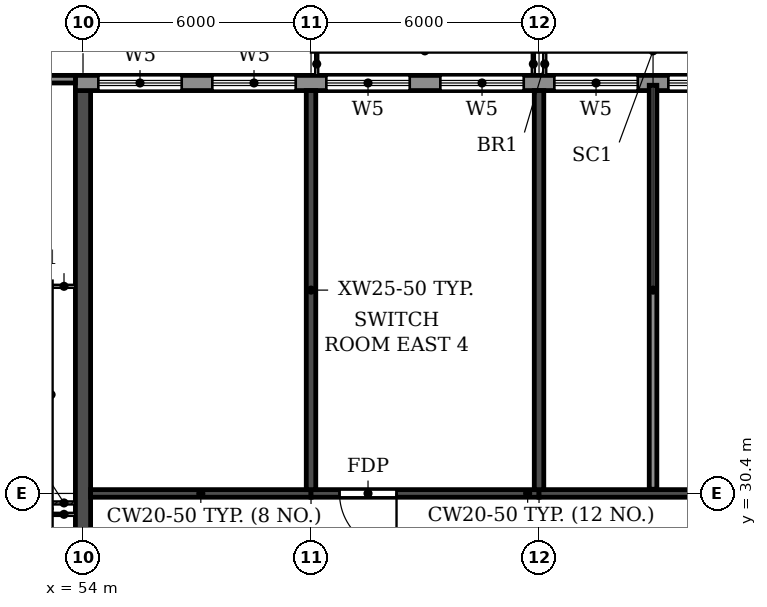
"""IFC4 building model, lengths in metres.
Left out: names, types, materials, properties, quantities, classifications, styles, units other than length and angle.
Written with IfcOpenShell. Run it as: python <this file> out.ifc"""

import sys

from ifc_helpers import new_model, si_unit, direction, frame, frame_2d, origin, place, context, subcontext, project, spatial, polyline, rectangle, outline, extrude, element, fill, save


model = new_model("IFC4")
c1 = context("Model", 3, precision=1e-05, world=origin(), true_north=direction((0.0, 1.0)))
c2 = subcontext(c1, "Body", "Model", "MODEL_VIEW")
j1 = project(units=[si_unit("LENGTHUNIT", "METRE"), si_unit("PLANEANGLEUNIT", "RADIAN")], contexts=[c1])
p1 = place(None, origin())
s1 = spatial("IfcSite", under=j1, at=p1, CompositionType="ELEMENT")
p2 = place(p1, origin())
s2 = spatial("IfcBuilding", under=s1, at=p2, CompositionType="ELEMENT")
p3 = place(p2, frame((0.0, 0.0, 272.4)))
s3 = spatial("IfcBuildingStorey", under=s2, at=p3, CompositionType="ELEMENT", Elevation=272.4)
for number, where, z_axis, x_axis in (
    (1, (60.0, 30.5, 0.0), (0.0, 0.0, 1.0), (0.0, 1.0, 0.0)),
    (2, (66.0, 30.5, 0.0), (0.0, 0.0, 1.0), (0.0, 1.0, 0.0)),
):
    element("IfcWall", number, at=place(p3, frame(where, z_axis=z_axis, x_axis=x_axis)), inside=s3, PredefinedType="SHEAR", context=c2, shape_type="SweptSolid", body=[
        extrude(rectangle(XDim=10.5, YDim=0.25, at=frame_2d((5.25, 0.0))), origin(), (0.0, 0.0, 1.0), 3.05),
    ])
p4 = place(p3, frame((54.0, 0.2, 0.0), z_axis=(0.0, 0.0, 1.0), x_axis=(0.0, 1.0, 0.0)))
e3 = element("IfcWall", 3, at=p4, inside=s3, PredefinedType="SHEAR", context=c2, shape_type="SweptSolid", body=[
    extrude(rectangle(XDim=40.8, YDim=0.4, at=frame_2d((20.4, 0.0))), origin(), (0.0, 0.0, 1.0), 3.05),
])
p5 = place(p3, frame((54.2, 30.4, 0.0), z_axis=(0.0, 0.0, 1.0), x_axis=(1.0, 0.0, 0.0)))
e4 = element("IfcWall", 4, at=p5, inside=s3, PredefinedType="SHEAR", context=c2, shape_type="SweptSolid", body=[
    extrude(rectangle(XDim=5.8, YDim=0.2, at=frame_2d((2.9, 0.0))), origin(), (0.0, 0.0, 1.0), 2.45),
])
p6 = place(p3, frame((60.0, 30.4, 0.0), z_axis=(0.0, 0.0, 1.0), x_axis=(1.0, 0.0, 0.0)))
e5 = element("IfcWall", 5, at=p6, inside=s3, PredefinedType="SHEAR", context=c2, shape_type="SweptSolid", body=[
    extrude(rectangle(XDim=6.0, YDim=0.2, at=frame_2d((3.0, 0.0))), origin(), (0.0, 0.0, 1.0), 2.45),
])
p7 = place(p6, frame((0.75, 0.0, 0.0)))
e6 = element("IfcOpeningElement", 6, at=p7, cuts=e5, PredefinedType="OPENING", context=c2, shape_type="SweptSolid", body=[
    extrude(rectangle(XDim=1.5, YDim=2.1, at=frame_2d((0.75, 1.05))), frame((0.0, 0.11, 0.0), z_axis=(0.0, -1.0, 0.0), x_axis=(1.0, 0.0, 0.0)), (0.0, 0.0, 1.0), 0.22),
])
p8 = place(p3, frame((66.0, 30.4, 0.0), z_axis=(0.0, 0.0, 1.0), x_axis=(1.0, 0.0, 0.0)))
e7 = element("IfcWall", 7, at=p8, inside=s3, PredefinedType="SHEAR", context=c2, shape_type="SweptSolid", body=[
    extrude(rectangle(XDim=6.0, YDim=0.2, at=frame_2d((3.0, 0.0))), origin(), (0.0, 0.0, 1.0), 2.45),
])
p9 = place(p3, frame((79.317, 41.2, 0.0), z_axis=(0.0, 0.0, 1.0), x_axis=(-1.0, 0.0, 0.0)))
e8 = element("IfcWall", 8, at=p9, inside=s3, PredefinedType="STANDARD", context=c2, shape_type="SweptSolid", body=[
    extrude(rectangle(XDim=25.517, YDim=0.4, at=frame_2d((12.759, 0.0))), origin(), (0.0, 0.0, 1.0), 3.05),
])
p10 = place(p9, frame((22.717, 0.0, 0.6)))
e9 = element("IfcOpeningElement", 9, at=p10, cuts=e8, PredefinedType="OPENING", context=c2, shape_type="SweptSolid", body=[
    extrude(rectangle(XDim=2.2, YDim=2.4, at=frame_2d((1.1, 1.2))), frame((0.0, 0.21, 0.0), z_axis=(0.0, -1.0, 0.0), x_axis=(1.0, 0.0, 0.0)), (0.0, 0.0, 1.0), 0.42),
])
p11 = place(p9, frame((19.717, 0.0, 0.6)))
e10 = element("IfcOpeningElement", 10, at=p11, cuts=e8, PredefinedType="OPENING", context=c2, shape_type="SweptSolid", body=[
    extrude(rectangle(XDim=2.2, YDim=2.4, at=frame_2d((1.1, 1.2))), frame((0.0, 0.21, 0.0), z_axis=(0.0, -1.0, 0.0), x_axis=(1.0, 0.0, 0.0)), (0.0, 0.0, 1.0), 0.42),
])
p12 = place(p9, frame((16.717, 0.0, 0.6)))
e11 = element("IfcOpeningElement", 11, at=p12, cuts=e8, PredefinedType="OPENING", context=c2, shape_type="SweptSolid", body=[
    extrude(rectangle(XDim=2.2, YDim=2.4, at=frame_2d((1.1, 1.2))), frame((0.0, 0.21, 0.0), z_axis=(0.0, -1.0, 0.0), x_axis=(1.0, 0.0, 0.0)), (0.0, 0.0, 1.0), 0.42),
])
p13 = place(p9, frame((13.717, 0.0, 0.6)))
e12 = element("IfcOpeningElement", 12, at=p13, cuts=e8, PredefinedType="OPENING", context=c2, shape_type="SweptSolid", body=[
    extrude(rectangle(XDim=2.2, YDim=2.4, at=frame_2d((1.1, 1.2))), frame((0.0, 0.21, 0.0), z_axis=(0.0, -1.0, 0.0), x_axis=(1.0, 0.0, 0.0)), (0.0, 0.0, 1.0), 0.42),
])
p14 = place(p9, frame((10.717, 0.0, 0.6)))
e13 = element("IfcOpeningElement", 13, at=p14, cuts=e8, PredefinedType="OPENING", context=c2, shape_type="SweptSolid", body=[
    extrude(rectangle(XDim=2.2, YDim=2.4, at=frame_2d((1.1, 1.2))), frame((0.0, 0.21, 0.0), z_axis=(0.0, -1.0, 0.0), x_axis=(1.0, 0.0, 0.0)), (0.0, 0.0, 1.0), 0.42),
])
p15 = place(p9, frame((7.717, 0.0, 0.6)))
e14 = element("IfcOpeningElement", 14, at=p15, cuts=e8, PredefinedType="OPENING", context=c2, shape_type="SweptSolid", body=[
    extrude(rectangle(XDim=2.2, YDim=2.4, at=frame_2d((1.1, 1.2))), frame((0.0, 0.21, 0.0), z_axis=(0.0, -1.0, 0.0), x_axis=(1.0, 0.0, 0.0)), (0.0, 0.0, 1.0), 0.42),
])
p16 = place(p9, frame((4.717, 0.0, 0.6)))
e15 = element("IfcOpeningElement", 15, at=p16, cuts=e8, PredefinedType="OPENING", context=c2, shape_type="SweptSolid", body=[
    extrude(rectangle(XDim=2.2, YDim=2.4, at=frame_2d((1.1, 1.2))), frame((0.0, 0.21, 0.0), z_axis=(0.0, -1.0, 0.0), x_axis=(1.0, 0.0, 0.0)), (0.0, 0.0, 1.0), 0.42),
])
p17 = place(p9, frame((1.717, 0.0, 0.6)))
e16 = element("IfcOpeningElement", 16, at=p17, cuts=e8, PredefinedType="OPENING", context=c2, shape_type="SweptSolid", body=[
    extrude(rectangle(XDim=2.2, YDim=2.4, at=frame_2d((1.1, 1.2))), frame((0.0, 0.21, 0.0), z_axis=(0.0, -1.0, 0.0), x_axis=(1.0, 0.0, 0.0)), (0.0, 0.0, 1.0), 0.42),
])
p18 = place(p3, origin())
e17 = element("IfcWall", 17, at=p18, inside=s3, PredefinedType="PARAPET", context=c2, shape_type="SweptSolid", body=[
    extrude(outline(polyline([(48.2, 41.4), (48.2, 41.2), (53.8, 41.2), (53.8, 41.4), (48.2, 41.4)])), origin(), (0.0, 0.0, 1.0), 1.1),
])
p19 = place(p3, frame((69.0, 30.51, 0.0), z_axis=(0.0, 0.0, 1.0), x_axis=(0.0, 1.0, 0.0)))
e18 = element("IfcWall", 18, at=p19, inside=s3, PredefinedType="PARTITIONING", context=c2, shape_type="SweptSolid", body=[
    extrude(rectangle(XDim=10.63, YDim=0.2, at=frame_2d((5.315, 0.0))), origin(), (0.0, 0.0, 1.0), 3.05),
])
p20 = place(p10, origin())
e19 = element("IfcWindow", 19, at=p20, inside=s3, PartitioningType="TRIPLE_PANEL_HORIZONTAL", PredefinedType="WINDOW", context=c2, shape_type="SweptSolid", body=[
    extrude(rectangle(XDim=2.2, YDim=2.4, at=frame_2d((1.1, 1.2))), frame((0.0, 0.03, 0.0), z_axis=(0.0, -1.0, 0.0), x_axis=(1.0, 0.0, 0.0)), (0.0, 0.0, 1.0), 0.06),
])
fill(e9, e19)
p21 = place(p11, origin())
e20 = element("IfcWindow", 20, at=p21, inside=s3, PartitioningType="TRIPLE_PANEL_HORIZONTAL", PredefinedType="WINDOW", context=c2, shape_type="SweptSolid", body=[
    extrude(rectangle(XDim=2.2, YDim=2.4, at=frame_2d((1.1, 1.2))), frame((0.0, 0.03, 0.0), z_axis=(0.0, -1.0, 0.0), x_axis=(1.0, 0.0, 0.0)), (0.0, 0.0, 1.0), 0.06),
])
fill(e10, e20)
p22 = place(p12, origin())
e21 = element("IfcWindow", 21, at=p22, inside=s3, PartitioningType="TRIPLE_PANEL_HORIZONTAL", PredefinedType="WINDOW", context=c2, shape_type="SweptSolid", body=[
    extrude(rectangle(XDim=2.2, YDim=2.4, at=frame_2d((1.1, 1.2))), frame((0.0, 0.03, 0.0), z_axis=(0.0, -1.0, 0.0), x_axis=(1.0, 0.0, 0.0)), (0.0, 0.0, 1.0), 0.06),
])
fill(e11, e21)
p23 = place(p13, origin())
e22 = element("IfcWindow", 22, at=p23, inside=s3, PartitioningType="TRIPLE_PANEL_HORIZONTAL", PredefinedType="WINDOW", context=c2, shape_type="SweptSolid", body=[
    extrude(rectangle(XDim=2.2, YDim=2.4, at=frame_2d((1.1, 1.2))), frame((0.0, 0.03, 0.0), z_axis=(0.0, -1.0, 0.0), x_axis=(1.0, 0.0, 0.0)), (0.0, 0.0, 1.0), 0.06),
])
fill(e12, e22)
p24 = place(p14, origin())
e23 = element("IfcWindow", 23, at=p24, inside=s3, PartitioningType="TRIPLE_PANEL_HORIZONTAL", PredefinedType="WINDOW", context=c2, shape_type="SweptSolid", body=[
    extrude(rectangle(XDim=2.2, YDim=2.4, at=frame_2d((1.1, 1.2))), frame((0.0, 0.03, 0.0), z_axis=(0.0, -1.0, 0.0), x_axis=(1.0, 0.0, 0.0)), (0.0, 0.0, 1.0), 0.06),
])
fill(e13, e23)
p25 = place(p15, origin())
e24 = element("IfcWindow", 24, at=p25, inside=s3, PartitioningType="TRIPLE_PANEL_HORIZONTAL", PredefinedType="WINDOW", context=c2, shape_type="SweptSolid", body=[
    extrude(rectangle(XDim=2.2, YDim=2.4, at=frame_2d((1.1, 1.2))), frame((0.0, 0.03, 0.0), z_axis=(0.0, -1.0, 0.0), x_axis=(1.0, 0.0, 0.0)), (0.0, 0.0, 1.0), 0.06),
])
fill(e14, e24)
p26 = place(p7, frame((1.5, 0.0, 0.0), z_axis=(0.0, 0.0, 1.0), x_axis=(-1.0, 0.0, 0.0)))
e25 = element("IfcDoor", 25, at=p26, inside=s3, OperationType="DOUBLE_DOOR_SINGLE_SWING", PredefinedType="DOOR", context=c2, shape_type="SweptSolid", body=[
    extrude(rectangle(XDim=1.5, YDim=2.1, at=frame_2d((0.75, 1.05))), frame((0.0, 0.025, 0.0), z_axis=(0.0, -1.0, 0.0), x_axis=(1.0, 0.0, 0.0)), (0.0, 0.0, 1.0), 0.05),
])
fill(e6, e25)
save(model, sys.argv[1])
